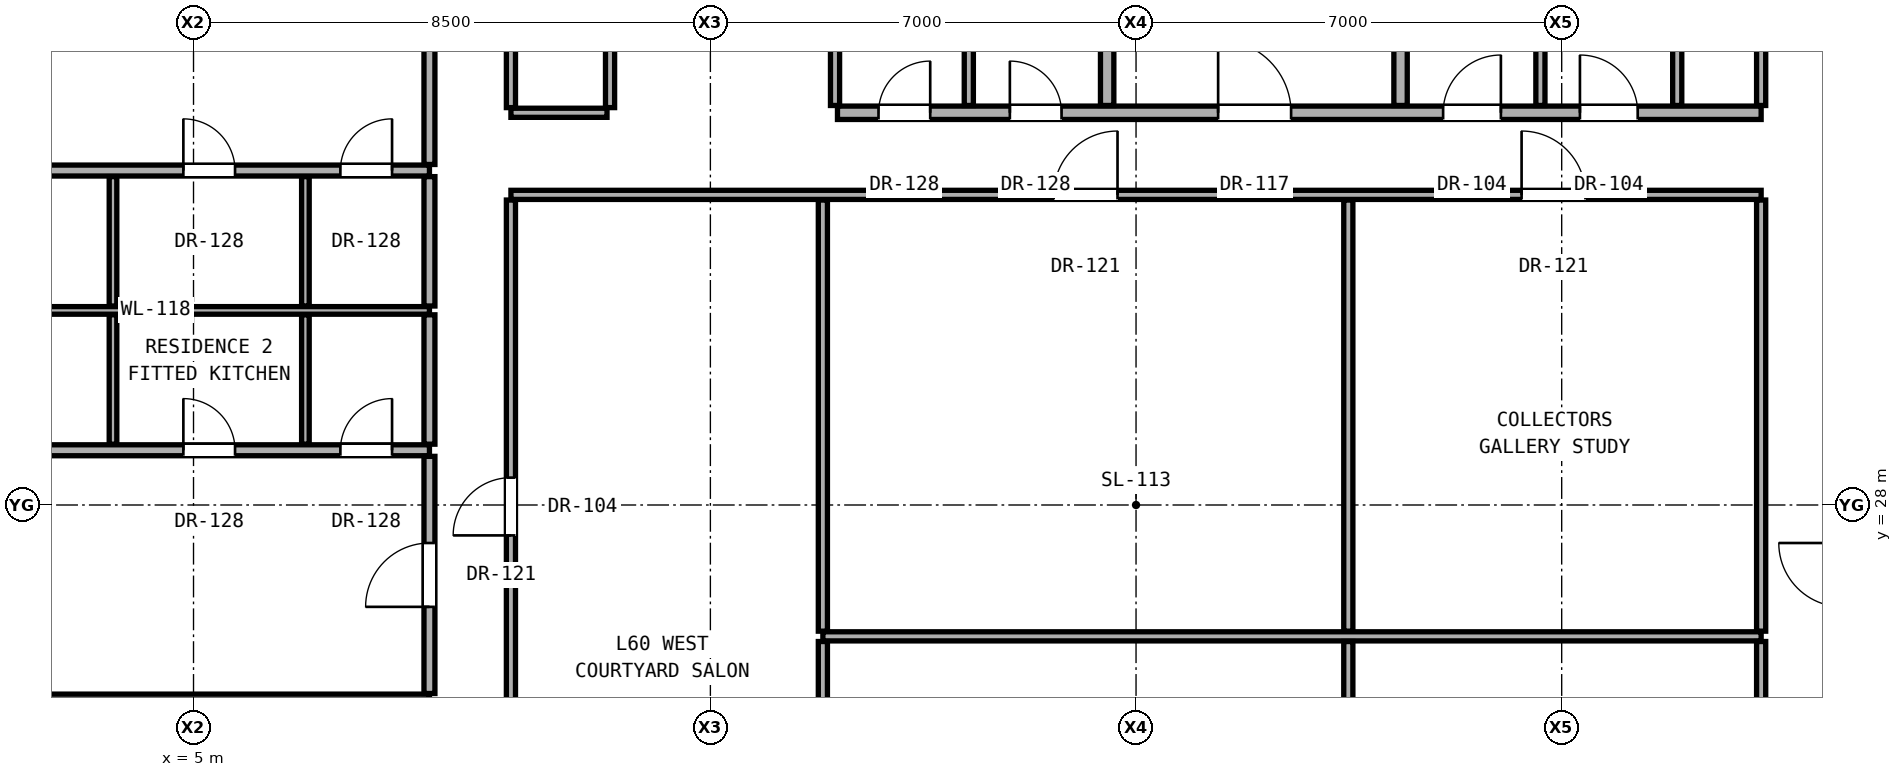
"""IFC4 building model, lengths in metres.
Left out: names, types, materials, properties, quantities, classifications, styles, units other than length and angle.
Written with IfcOpenShell. Run it as: python <this file> out.ifc"""

import sys

from ifc_helpers import new_model, si_unit, direction, frame, frame_2d, origin, place, context, subcontext, project, spatial, rectangle, extrude, element, fill, save


model = new_model("IFC4")
c1 = context("Model", 3, precision=1e-05, world=origin(), true_north=direction((0.0, 1.0)))
c2 = subcontext(c1, "Body", "Model", "MODEL_VIEW")
j1 = project(units=[si_unit("LENGTHUNIT", "METRE"), si_unit("PLANEANGLEUNIT", "RADIAN")], contexts=[c1])
p1 = place(None, origin())
s1 = spatial("IfcSite", under=j1, at=p1, CompositionType="ELEMENT")
p2 = place(p1, origin())
s2 = spatial("IfcBuilding", under=s1, at=p2, CompositionType="ELEMENT")
p3 = place(p2, frame((0.0, 0.0, 209.65)))
s3 = spatial("IfcBuildingStorey", under=s2, at=p3, CompositionType="ELEMENT", Elevation=209.65)
p4 = place(p3, frame((-1.07, 24.8, 0.0), z_axis=(0.0, 0.0, 1.0), x_axis=(1.0, 0.0, 0.0)))
e1 = element("IfcWall", 1, at=p4, inside=s3, PredefinedType="PARTITIONING", context=c2, shape_type="SweptSolid", body=[
    extrude(rectangle(XDim=9.95, YDim=0.18, at=frame_2d((4.975, 0.0))), origin(), (0.0, 0.0, 1.0), 2.109),
])
p5 = place(p3, frame((15.35, 25.84, 0.0), z_axis=(0.0, 0.0, 1.0), x_axis=(1.0, 0.0, 0.0)))
e2 = element("IfcWall", 2, at=p5, inside=s3, PredefinedType="PARTITIONING", context=c2, shape_type="SweptSolid", body=[
    extrude(rectangle(XDim=15.43, YDim=0.15, at=frame_2d((7.715, 0.0))), origin(), (0.0, 0.0, 1.0), 2.266),
])
p6 = place(p3, frame((-1.07, 28.9, 0.0), z_axis=(0.0, 0.0, 1.0), x_axis=(1.0, 0.0, 0.0)))
e3 = element("IfcWall", 3, at=p6, inside=s3, PredefinedType="PARTITIONING", context=c2, shape_type="SweptSolid", body=[
    extrude(rectangle(XDim=9.95, YDim=0.18, at=frame_2d((4.975, 0.0))), origin(), (0.0, 0.0, 1.0), 2.109),
])
p7 = place(p6, frame((1.968, 0.0, 0.0)))
e4 = element("IfcOpeningElement", 4, at=p7, cuts=e3, PredefinedType="OPENING", context=c2, shape_type="SweptSolid", body=[
    extrude(rectangle(XDim=0.85, YDim=2.01, at=frame_2d((0.425, 1.005))), frame((0.0, 0.1, 0.0), z_axis=(0.0, -1.0, 0.0), x_axis=(1.0, 0.0, 0.0)), (0.0, 0.0, 1.0), 0.2),
])
p8 = place(p6, frame((5.903, 0.0, 0.0)))
e5 = element("IfcOpeningElement", 5, at=p8, cuts=e3, PredefinedType="OPENING", context=c2, shape_type="SweptSolid", body=[
    extrude(rectangle(XDim=0.85, YDim=2.01, at=frame_2d((0.425, 1.005))), frame((0.0, 0.1, 0.0), z_axis=(0.0, -1.0, 0.0), x_axis=(1.0, 0.0, 0.0)), (0.0, 0.0, 1.0), 0.2),
])
p9 = place(p6, frame((8.485, 0.0, 0.0)))
e6 = element("IfcOpeningElement", 6, at=p9, cuts=e3, PredefinedType="OPENING", context=c2, shape_type="SweptSolid", body=[
    extrude(rectangle(XDim=0.85, YDim=2.01, at=frame_2d((0.425, 1.005))), frame((0.0, 0.1, 0.0), z_axis=(0.0, -1.0, 0.0), x_axis=(1.0, 0.0, 0.0)), (0.0, 0.0, 1.0), 0.2),
])
p10 = place(p3, frame((-1.07, 31.2, 0.0), z_axis=(0.0, 0.0, 1.0), x_axis=(1.0, 0.0, 0.0)))
e7 = element("IfcWall", 7, at=p10, inside=s3, PredefinedType="PARTITIONING", context=c2, shape_type="SweptSolid", body=[
    extrude(rectangle(XDim=9.95, YDim=0.125, at=frame_2d((4.975, 0.0))), origin(), (0.0, 0.0, 1.0), 2.109),
])
p11 = place(p3, frame((10.22, 33.1, 0.0), z_axis=(0.0, 0.0, 1.0), x_axis=(1.0, 0.0, 0.0)))
e8 = element("IfcWall", 8, at=p11, inside=s3, PredefinedType="PARTITIONING", context=c2, shape_type="SweptSolid", body=[
    extrude(rectangle(XDim=20.56, YDim=0.15, at=frame_2d((10.28, 0.0))), origin(), (0.0, 0.0, 1.0), 2.266),
])
p12 = place(p11, frame((8.926, 0.0, 0.0)))
e9 = element("IfcOpeningElement", 9, at=p12, cuts=e8, PredefinedType="OPENING", context=c2, shape_type="SweptSolid", body=[
    extrude(rectangle(XDim=1.05, YDim=2.2, at=frame_2d((0.525, 1.1))), frame((0.0, 0.085, 0.0), z_axis=(0.0, -1.0, 0.0), x_axis=(1.0, 0.0, 0.0)), (0.0, 0.0, 1.0), 0.17),
])
p13 = place(p11, frame((16.621, 0.0, 0.0)))
e10 = element("IfcOpeningElement", 10, at=p13, cuts=e8, PredefinedType="OPENING", context=c2, shape_type="SweptSolid", body=[
    extrude(rectangle(XDim=1.05, YDim=2.2, at=frame_2d((0.525, 1.1))), frame((0.0, 0.085, 0.0), z_axis=(0.0, -1.0, 0.0), x_axis=(1.0, 0.0, 0.0)), (0.0, 0.0, 1.0), 0.17),
])
p14 = place(p3, frame((-1.07, 33.5, 0.0), z_axis=(0.0, 0.0, 1.0), x_axis=(1.0, 0.0, 0.0)))
e11 = element("IfcWall", 11, at=p14, inside=s3, PredefinedType="PARTITIONING", context=c2, shape_type="SweptSolid", body=[
    extrude(rectangle(XDim=9.95, YDim=0.18, at=frame_2d((4.975, 0.0))), origin(), (0.0, 0.0, 1.0), 2.109),
])
p15 = place(p14, frame((1.968, 0.0, 0.0)))
e12 = element("IfcOpeningElement", 12, at=p15, cuts=e11, PredefinedType="OPENING", context=c2, shape_type="SweptSolid", body=[
    extrude(rectangle(XDim=0.85, YDim=2.01, at=frame_2d((0.425, 1.005))), frame((0.0, 0.1, 0.0), z_axis=(0.0, -1.0, 0.0), x_axis=(1.0, 0.0, 0.0)), (0.0, 0.0, 1.0), 0.2),
])
p16 = place(p14, frame((5.903, 0.0, 0.0)))
e13 = element("IfcOpeningElement", 13, at=p16, cuts=e11, PredefinedType="OPENING", context=c2, shape_type="SweptSolid", body=[
    extrude(rectangle(XDim=0.85, YDim=2.01, at=frame_2d((0.425, 1.005))), frame((0.0, 0.1, 0.0), z_axis=(0.0, -1.0, 0.0), x_axis=(1.0, 0.0, 0.0)), (0.0, 0.0, 1.0), 0.2),
])
p17 = place(p14, frame((8.485, 0.0, 0.0)))
e14 = element("IfcOpeningElement", 14, at=p17, cuts=e11, PredefinedType="OPENING", context=c2, shape_type="SweptSolid", body=[
    extrude(rectangle(XDim=0.85, YDim=2.01, at=frame_2d((0.425, 1.005))), frame((0.0, 0.1, 0.0), z_axis=(0.0, -1.0, 0.0), x_axis=(1.0, 0.0, 0.0)), (0.0, 0.0, 1.0), 0.2),
])
p18 = place(p3, frame((10.22, 34.45, 0.0), z_axis=(0.0, 0.0, 1.0), x_axis=(1.0, 0.0, 0.0)))
e15 = element("IfcWall", 15, at=p18, inside=s3, PredefinedType="PARTITIONING", context=c2, shape_type="SweptSolid", body=[
    extrude(rectangle(XDim=1.58, YDim=0.15, at=frame_2d((0.79, 0.0))), origin(), (0.0, 0.0, 1.0), 2.266),
])
p19 = place(p3, frame((15.59, 34.45, 0.0), z_axis=(0.0, 0.0, 1.0), x_axis=(1.0, 0.0, 0.0)))
e16 = element("IfcWall", 16, at=p19, inside=s3, PredefinedType="SOLIDWALL", context=c2, shape_type="SweptSolid", body=[
    extrude(rectangle(XDim=15.19, YDim=0.22, at=frame_2d((7.595, 0.0))), origin(), (0.0, 0.0, 1.0), 2.266),
])
p20 = place(p19, frame((6.26, 0.0, 0.0)))
e17 = element("IfcOpeningElement", 17, at=p20, cuts=e16, PredefinedType="OPENING", context=c2, shape_type="SweptSolid", body=[
    extrude(rectangle(XDim=1.2, YDim=2.25, at=frame_2d((0.6, 1.125))), frame((0.0, 0.12, 0.0), z_axis=(0.0, -1.0, 0.0), x_axis=(1.0, 0.0, 0.0)), (0.0, 0.0, 1.0), 0.24),
])
p21 = place(p19, frame((9.96, 0.0, 0.0)))
e18 = element("IfcOpeningElement", 18, at=p21, cuts=e16, PredefinedType="OPENING", context=c2, shape_type="SweptSolid", body=[
    extrude(rectangle(XDim=0.95, YDim=2.15, at=frame_2d((0.475, 1.075))), frame((0.0, 0.12, 0.0), z_axis=(0.0, -1.0, 0.0), x_axis=(1.0, 0.0, 0.0)), (0.0, 0.0, 1.0), 0.24),
])
p22 = place(p19, frame((12.21, 0.0, 0.0)))
e19 = element("IfcOpeningElement", 19, at=p22, cuts=e16, PredefinedType="OPENING", context=c2, shape_type="SweptSolid", body=[
    extrude(rectangle(XDim=0.95, YDim=2.15, at=frame_2d((0.475, 1.075))), frame((0.0, 0.12, 0.0), z_axis=(0.0, -1.0, 0.0), x_axis=(1.0, 0.0, 0.0)), (0.0, 0.0, 1.0), 0.24),
])
p23 = place(p19, frame((0.675, 0.0, 0.0)))
e20 = element("IfcOpeningElement", 20, at=p23, cuts=e16, PredefinedType="OPENING", context=c2, shape_type="SweptSolid", body=[
    extrude(rectangle(XDim=0.85, YDim=2.01, at=frame_2d((0.425, 1.005))), frame((0.0, 0.12, 0.0), z_axis=(0.0, -1.0, 0.0), x_axis=(1.0, 0.0, 0.0)), (0.0, 0.0, 1.0), 0.24),
])
p24 = place(p19, frame((2.835, 0.0, 0.0)))
e21 = element("IfcOpeningElement", 21, at=p24, cuts=e16, PredefinedType="OPENING", context=c2, shape_type="SweptSolid", body=[
    extrude(rectangle(XDim=0.85, YDim=2.01, at=frame_2d((0.425, 1.005))), frame((0.0, 0.12, 0.0), z_axis=(0.0, -1.0, 0.0), x_axis=(1.0, 0.0, 0.0)), (0.0, 0.0, 1.0), 0.24),
])
for number, where, z_axis, x_axis in (
    (22, (3.676, 29.0, 0.0), (0.0, 0.0, 1.0), (0.0, 1.0, 0.0)),
    (23, (3.676, 31.272, 0.0), (0.0, 0.0, 1.0), (0.0, 1.0, 0.0)),
    (24, (6.84, 29.0, 0.0), (0.0, 0.0, 1.0), (0.0, 1.0, 0.0)),
    (25, (6.84, 31.272, 0.0), (0.0, 0.0, 1.0), (0.0, 1.0, 0.0)),
):
    element("IfcWall", number, at=place(p3, frame(where, z_axis=z_axis, x_axis=x_axis)), inside=s3, PredefinedType="PARTITIONING", context=c2, shape_type="SweptSolid", body=[
        extrude(rectangle(XDim=2.127, YDim=0.125, at=frame_2d((1.064, 0.0))), origin(), (0.0, 0.0, 1.0), 2.266),
    ])
p25 = place(p3, frame((8.88, 24.9, 0.0), z_axis=(0.0, 0.0, 1.0), x_axis=(0.0, 1.0, 0.0)))
e26 = element("IfcWall", 26, at=p25, inside=s3, PredefinedType="PARTITIONING", context=c2, shape_type="SweptSolid", body=[
    extrude(rectangle(XDim=3.9, YDim=0.18, at=frame_2d((1.95, 0.0))), origin(), (0.0, 0.0, 1.0), 2.266),
])
p26 = place(p25, frame((1.425, 0.0, 0.0)))
e27 = element("IfcOpeningElement", 27, at=p26, cuts=e26, PredefinedType="OPENING", context=c2, shape_type="SweptSolid", body=[
    extrude(rectangle(XDim=1.05, YDim=2.2, at=frame_2d((0.525, 1.1))), frame((0.0, 0.1, 0.0), z_axis=(0.0, -1.0, 0.0), x_axis=(1.0, 0.0, 0.0)), (0.0, 0.0, 1.0), 0.2),
])
for number, where, z_axis, x_axis in (
    (28, (8.88, 29.0, 0.0), (0.0, 0.0, 1.0), (0.0, 1.0, 0.0)),
    (29, (8.88, 31.272, 0.0), (0.0, 0.0, 1.0), (0.0, 1.0, 0.0)),
):
    element("IfcWall", number, at=place(p3, frame(where, z_axis=z_axis, x_axis=x_axis)), inside=s3, PredefinedType="PARTITIONING", context=c2, shape_type="SweptSolid", body=[
        extrude(rectangle(XDim=2.127, YDim=0.18, at=frame_2d((1.064, 0.0))), origin(), (0.0, 0.0, 1.0), 2.266),
    ])
p27 = place(p3, frame((8.88, 33.6, 0.0), z_axis=(0.0, 0.0, 1.0), x_axis=(0.0, 1.0, 0.0)))
e30 = element("IfcWall", 30, at=p27, inside=s3, PredefinedType="PARTITIONING", context=c2, shape_type="SweptSolid", body=[
    extrude(rectangle(XDim=7.859, YDim=0.18, at=frame_2d((3.929, 0.0))), origin(), (0.0, 0.0, 1.0), 2.282),
])
p28 = place(p27, frame((3.405, 0.0, 0.0)))
e31 = element("IfcOpeningElement", 31, at=p28, cuts=e30, PredefinedType="OPENING", context=c2, shape_type="SweptSolid", body=[
    extrude(rectangle(XDim=1.05, YDim=2.2, at=frame_2d((0.525, 1.1))), frame((0.0, 0.1, 0.0), z_axis=(0.0, -1.0, 0.0), x_axis=(1.0, 0.0, 0.0)), (0.0, 0.0, 1.0), 0.2),
])
p29 = place(p3, frame((10.22, 22.935, 0.0), z_axis=(0.0, 0.0, 1.0), x_axis=(0.0, 1.0, 0.0)))
e32 = element("IfcWall", 32, at=p29, inside=s3, PredefinedType="PARTITIONING", context=c2, shape_type="SweptSolid", body=[
    extrude(rectangle(XDim=10.08, YDim=0.15, at=frame_2d((5.04, 0.0))), origin(), (0.0, 0.0, 1.0), 2.266),
])
p30 = place(p29, frame((4.565, 0.0, 0.0)))
e33 = element("IfcOpeningElement", 33, at=p30, cuts=e32, PredefinedType="OPENING", context=c2, shape_type="SweptSolid", body=[
    extrude(rectangle(XDim=0.95, YDim=2.15, at=frame_2d((0.475, 1.075))), frame((0.0, 0.085, 0.0), z_axis=(0.0, -1.0, 0.0), x_axis=(1.0, 0.0, 0.0)), (0.0, 0.0, 1.0), 0.17),
])
p31 = place(p3, frame((10.22, 34.535, 0.0), z_axis=(0.0, 0.0, 1.0), x_axis=(0.0, 1.0, 0.0)))
e34 = element("IfcWall", 34, at=p31, inside=s3, PredefinedType="PARTITIONING", context=c2, shape_type="SweptSolid", body=[
    extrude(rectangle(XDim=9.13, YDim=0.15, at=frame_2d((4.565, 0.0))), origin(), (0.0, 0.0, 1.0), 2.282),
])
p32 = place(p3, frame((11.85, 34.535, 0.0), z_axis=(0.0, 0.0, 1.0), x_axis=(0.0, 1.0, 0.0)))
e35 = element("IfcWall", 35, at=p32, inside=s3, PredefinedType="PARTITIONING", context=c2, shape_type="SweptSolid", body=[
    extrude(rectangle(XDim=2.845, YDim=0.15, at=frame_2d((1.422, 0.0))), origin(), (0.0, 0.0, 1.0), 2.89),
])
p33 = place(p3, frame((15.35, 22.935, 0.0), z_axis=(0.0, 0.0, 1.0), x_axis=(0.0, 1.0, 0.0)))
e36 = element("IfcWall", 36, at=p33, inside=s3, PredefinedType="PARTITIONING", context=c2, shape_type="SweptSolid", body=[
    extrude(rectangle(XDim=2.82, YDim=0.15, at=frame_2d((1.41, 0.0))), origin(), (0.0, 0.0, 1.0), 2.266),
])
p34 = place(p3, frame((15.35, 25.925, 0.0), z_axis=(0.0, 0.0, 1.0), x_axis=(0.0, 1.0, 0.0)))
e37 = element("IfcWall", 37, at=p34, inside=s3, PredefinedType="PARTITIONING", context=c2, shape_type="SweptSolid", body=[
    extrude(rectangle(XDim=7.09, YDim=0.15, at=frame_2d((3.545, 0.0))), origin(), (0.0, 0.0, 1.0), 2.266),
])
for number, where, z_axis, x_axis in (
    (38, (15.55, 34.57, 0.0), (0.0, 0.0, 1.0), (0.0, 1.0, 0.0)),
    (39, (17.75, 34.57, 0.0), (0.0, 0.0, 1.0), (0.0, 1.0, 0.0)),
):
    element("IfcWall", number, at=place(p3, frame(where, z_axis=z_axis, x_axis=x_axis)), inside=s3, PredefinedType="PARTITIONING", context=c2, shape_type="SweptSolid", body=[
        extrude(rectangle(XDim=2.81, YDim=0.15, at=frame_2d((1.405, 0.0))), origin(), (0.0, 0.0, 1.0), 2.89),
    ])
p35 = place(p3, frame((20.025, 34.57, 0.0), z_axis=(0.0, 0.0, 1.0), x_axis=(0.0, 1.0, 0.0)))
e40 = element("IfcWall", 40, at=p35, inside=s3, PredefinedType="SOLIDWALL", context=c2, shape_type="SweptSolid", body=[
    extrude(rectangle(XDim=2.81, YDim=0.22, at=frame_2d((1.405, 0.0))), origin(), (0.0, 0.0, 1.0), 2.89),
])
p36 = place(p3, frame((23.991, 19.985, 0.0), z_axis=(0.0, 0.0, 1.0), x_axis=(0.0, 1.0, 0.0)))
e41 = element("IfcWall", 41, at=p36, inside=s3, PredefinedType="PARTITIONING", context=c2, shape_type="SweptSolid", body=[
    extrude(rectangle(XDim=5.77, YDim=0.15, at=frame_2d((2.885, 0.0))), origin(), (0.0, 0.0, 1.0), 2.266),
])
p37 = place(p3, frame((23.991, 25.925, 0.0), z_axis=(0.0, 0.0, 1.0), x_axis=(0.0, 1.0, 0.0)))
e42 = element("IfcWall", 42, at=p37, inside=s3, PredefinedType="PARTITIONING", context=c2, shape_type="SweptSolid", body=[
    extrude(rectangle(XDim=7.09, YDim=0.15, at=frame_2d((3.545, 0.0))), origin(), (0.0, 0.0, 1.0), 2.266),
])
p38 = place(p3, frame((24.85, 34.57, 0.0), z_axis=(0.0, 0.0, 1.0), x_axis=(0.0, 1.0, 0.0)))
e43 = element("IfcWall", 43, at=p38, inside=s3, PredefinedType="SOLIDWALL", context=c2, shape_type="SweptSolid", body=[
    extrude(rectangle(XDim=2.81, YDim=0.22, at=frame_2d((1.405, 0.0))), origin(), (0.0, 0.0, 1.0), 2.89),
])
for number, where, z_axis, x_axis in (
    (44, (27.15, 34.57, 0.0), (0.0, 0.0, 1.0), (0.0, 1.0, 0.0)),
    (45, (29.4, 34.57, 0.0), (0.0, 0.0, 1.0), (0.0, 1.0, 0.0)),
):
    element("IfcWall", number, at=place(p3, frame(where, z_axis=z_axis, x_axis=x_axis)), inside=s3, PredefinedType="PARTITIONING", context=c2, shape_type="SweptSolid", body=[
        extrude(rectangle(XDim=2.81, YDim=0.15, at=frame_2d((1.405, 0.0))), origin(), (0.0, 0.0, 1.0), 2.89),
    ])
p39 = place(p3, frame((30.78, 19.985, 0.0), z_axis=(0.0, 0.0, 1.0), x_axis=(0.0, 1.0, 0.0)))
e46 = element("IfcWall", 46, at=p39, inside=s3, PredefinedType="PARTITIONING", context=c2, shape_type="SweptSolid", body=[
    extrude(rectangle(XDim=5.77, YDim=0.15, at=frame_2d((2.885, 0.0))), origin(), (0.0, 0.0, 1.0), 2.266),
])
p40 = place(p3, frame((30.78, 25.925, 0.0), z_axis=(0.0, 0.0, 1.0), x_axis=(0.0, 1.0, 0.0)))
e47 = element("IfcWall", 47, at=p40, inside=s3, PredefinedType="PARTITIONING", context=c2, shape_type="SweptSolid", body=[
    extrude(rectangle(XDim=7.09, YDim=0.15, at=frame_2d((3.545, 0.0))), origin(), (0.0, 0.0, 1.0), 2.266),
])
p41 = place(p3, frame((30.78, 34.57, 0.0), z_axis=(0.0, 0.0, 1.0), x_axis=(0.0, 1.0, 0.0)))
e48 = element("IfcWall", 48, at=p41, inside=s3, PredefinedType="PARTITIONING", context=c2, shape_type="SweptSolid", body=[
    extrude(rectangle(XDim=9.095, YDim=0.15, at=frame_2d((4.547, 0.0))), origin(), (0.0, 0.0, 1.0), 2.282),
])
p42 = place(p20, origin())
e49 = element("IfcDoor", 49, at=p42, inside=s3, OperationType="SINGLE_SWING_LEFT", PredefinedType="DOOR", context=c2, shape_type="SweptSolid", body=[
    extrude(rectangle(XDim=1.2, YDim=2.25, at=frame_2d((0.6, 1.125))), frame((0.0, 0.025, 0.0), z_axis=(0.0, -1.0, 0.0), x_axis=(1.0, 0.0, 0.0)), (0.0, 0.0, 1.0), 0.05),
])
fill(e17, e49)
p43 = place(p21, origin())
e50 = element("IfcDoor", 50, at=p43, inside=s3, OperationType="SINGLE_SWING_RIGHT", PredefinedType="DOOR", context=c2, shape_type="SweptSolid", body=[
    extrude(rectangle(XDim=0.95, YDim=2.15, at=frame_2d((0.475, 1.075))), frame((0.0, 0.025, 0.0), z_axis=(0.0, -1.0, 0.0), x_axis=(1.0, 0.0, 0.0)), (0.0, 0.0, 1.0), 0.05),
])
fill(e18, e50)
p44 = place(p22, origin())
e51 = element("IfcDoor", 51, at=p44, inside=s3, OperationType="SINGLE_SWING_LEFT", PredefinedType="DOOR", context=c2, shape_type="SweptSolid", body=[
    extrude(rectangle(XDim=0.95, YDim=2.15, at=frame_2d((0.475, 1.075))), frame((0.0, 0.025, 0.0), z_axis=(0.0, -1.0, 0.0), x_axis=(1.0, 0.0, 0.0)), (0.0, 0.0, 1.0), 0.05),
])
fill(e19, e51)
p45 = place(p23, origin())
e52 = element("IfcDoor", 52, at=p45, inside=s3, OperationType="SINGLE_SWING_RIGHT", PredefinedType="DOOR", context=c2, shape_type="SweptSolid", body=[
    extrude(rectangle(XDim=0.85, YDim=2.01, at=frame_2d((0.425, 1.005))), frame((0.0, 0.025, 0.0), z_axis=(0.0, -1.0, 0.0), x_axis=(1.0, 0.0, 0.0)), (0.0, 0.0, 1.0), 0.05),
])
fill(e20, e52)
p46 = place(p24, origin())
e53 = element("IfcDoor", 53, at=p46, inside=s3, OperationType="SINGLE_SWING_LEFT", PredefinedType="DOOR", context=c2, shape_type="SweptSolid", body=[
    extrude(rectangle(XDim=0.85, YDim=2.01, at=frame_2d((0.425, 1.005))), frame((0.0, 0.025, 0.0), z_axis=(0.0, -1.0, 0.0), x_axis=(1.0, 0.0, 0.0)), (0.0, 0.0, 1.0), 0.05),
])
fill(e21, e53)
p47 = place(p26, origin())
e54 = element("IfcDoor", 54, at=p47, inside=s3, OperationType="SINGLE_SWING_LEFT", PredefinedType="DOOR", context=c2, shape_type="SweptSolid", body=[
    extrude(rectangle(XDim=1.05, YDim=2.2, at=frame_2d((0.525, 1.1))), frame((0.0, 0.025, 0.0), z_axis=(0.0, -1.0, 0.0), x_axis=(1.0, 0.0, 0.0)), (0.0, 0.0, 1.0), 0.05),
])
fill(e27, e54)
p48 = place(p8, origin())
e55 = element("IfcDoor", 55, at=p48, inside=s3, OperationType="SINGLE_SWING_LEFT", PredefinedType="DOOR", context=c2, shape_type="SweptSolid", body=[
    extrude(rectangle(XDim=0.85, YDim=2.01, at=frame_2d((0.425, 1.005))), frame((0.0, 0.025, 0.0), z_axis=(0.0, -1.0, 0.0), x_axis=(1.0, 0.0, 0.0)), (0.0, 0.0, 1.0), 0.05),
])
fill(e5, e55)
p49 = place(p9, origin())
e56 = element("IfcDoor", 56, at=p49, inside=s3, OperationType="SINGLE_SWING_RIGHT", PredefinedType="DOOR", context=c2, shape_type="SweptSolid", body=[
    extrude(rectangle(XDim=0.85, YDim=2.01, at=frame_2d((0.425, 1.005))), frame((0.0, 0.025, 0.0), z_axis=(0.0, -1.0, 0.0), x_axis=(1.0, 0.0, 0.0)), (0.0, 0.0, 1.0), 0.05),
])
fill(e6, e56)
p50 = place(p16, origin())
e57 = element("IfcDoor", 57, at=p50, inside=s3, OperationType="SINGLE_SWING_LEFT", PredefinedType="DOOR", context=c2, shape_type="SweptSolid", body=[
    extrude(rectangle(XDim=0.85, YDim=2.01, at=frame_2d((0.425, 1.005))), frame((0.0, 0.025, 0.0), z_axis=(0.0, -1.0, 0.0), x_axis=(1.0, 0.0, 0.0)), (0.0, 0.0, 1.0), 0.05),
])
fill(e13, e57)
p51 = place(p17, origin())
e58 = element("IfcDoor", 58, at=p51, inside=s3, OperationType="SINGLE_SWING_RIGHT", PredefinedType="DOOR", context=c2, shape_type="SweptSolid", body=[
    extrude(rectangle(XDim=0.85, YDim=2.01, at=frame_2d((0.425, 1.005))), frame((0.0, 0.025, 0.0), z_axis=(0.0, -1.0, 0.0), x_axis=(1.0, 0.0, 0.0)), (0.0, 0.0, 1.0), 0.05),
])
fill(e14, e58)
p52 = place(p30, origin())
e59 = element("IfcDoor", 59, at=p52, inside=s3, OperationType="SINGLE_SWING_LEFT", PredefinedType="DOOR", context=c2, shape_type="SweptSolid", body=[
    extrude(rectangle(XDim=0.95, YDim=2.15, at=frame_2d((0.475, 1.075))), frame((0.0, 0.025, 0.0), z_axis=(0.0, -1.0, 0.0), x_axis=(1.0, 0.0, 0.0)), (0.0, 0.0, 1.0), 0.05),
])
fill(e33, e59)
p53 = place(p12, origin())
e60 = element("IfcDoor", 60, at=p53, inside=s3, OperationType="SINGLE_SWING_RIGHT", PredefinedType="DOOR", context=c2, shape_type="SweptSolid", body=[
    extrude(rectangle(XDim=1.05, YDim=2.2, at=frame_2d((0.525, 1.1))), frame((0.0, 0.025, 0.0), z_axis=(0.0, -1.0, 0.0), x_axis=(1.0, 0.0, 0.0)), (0.0, 0.0, 1.0), 0.05),
])
fill(e9, e60)
p54 = place(p13, origin())
e61 = element("IfcDoor", 61, at=p54, inside=s3, OperationType="SINGLE_SWING_LEFT", PredefinedType="DOOR", context=c2, shape_type="SweptSolid", body=[
    extrude(rectangle(XDim=1.05, YDim=2.2, at=frame_2d((0.525, 1.1))), frame((0.0, 0.025, 0.0), z_axis=(0.0, -1.0, 0.0), x_axis=(1.0, 0.0, 0.0)), (0.0, 0.0, 1.0), 0.05),
])
fill(e10, e61)
save(model, sys.argv[1])
